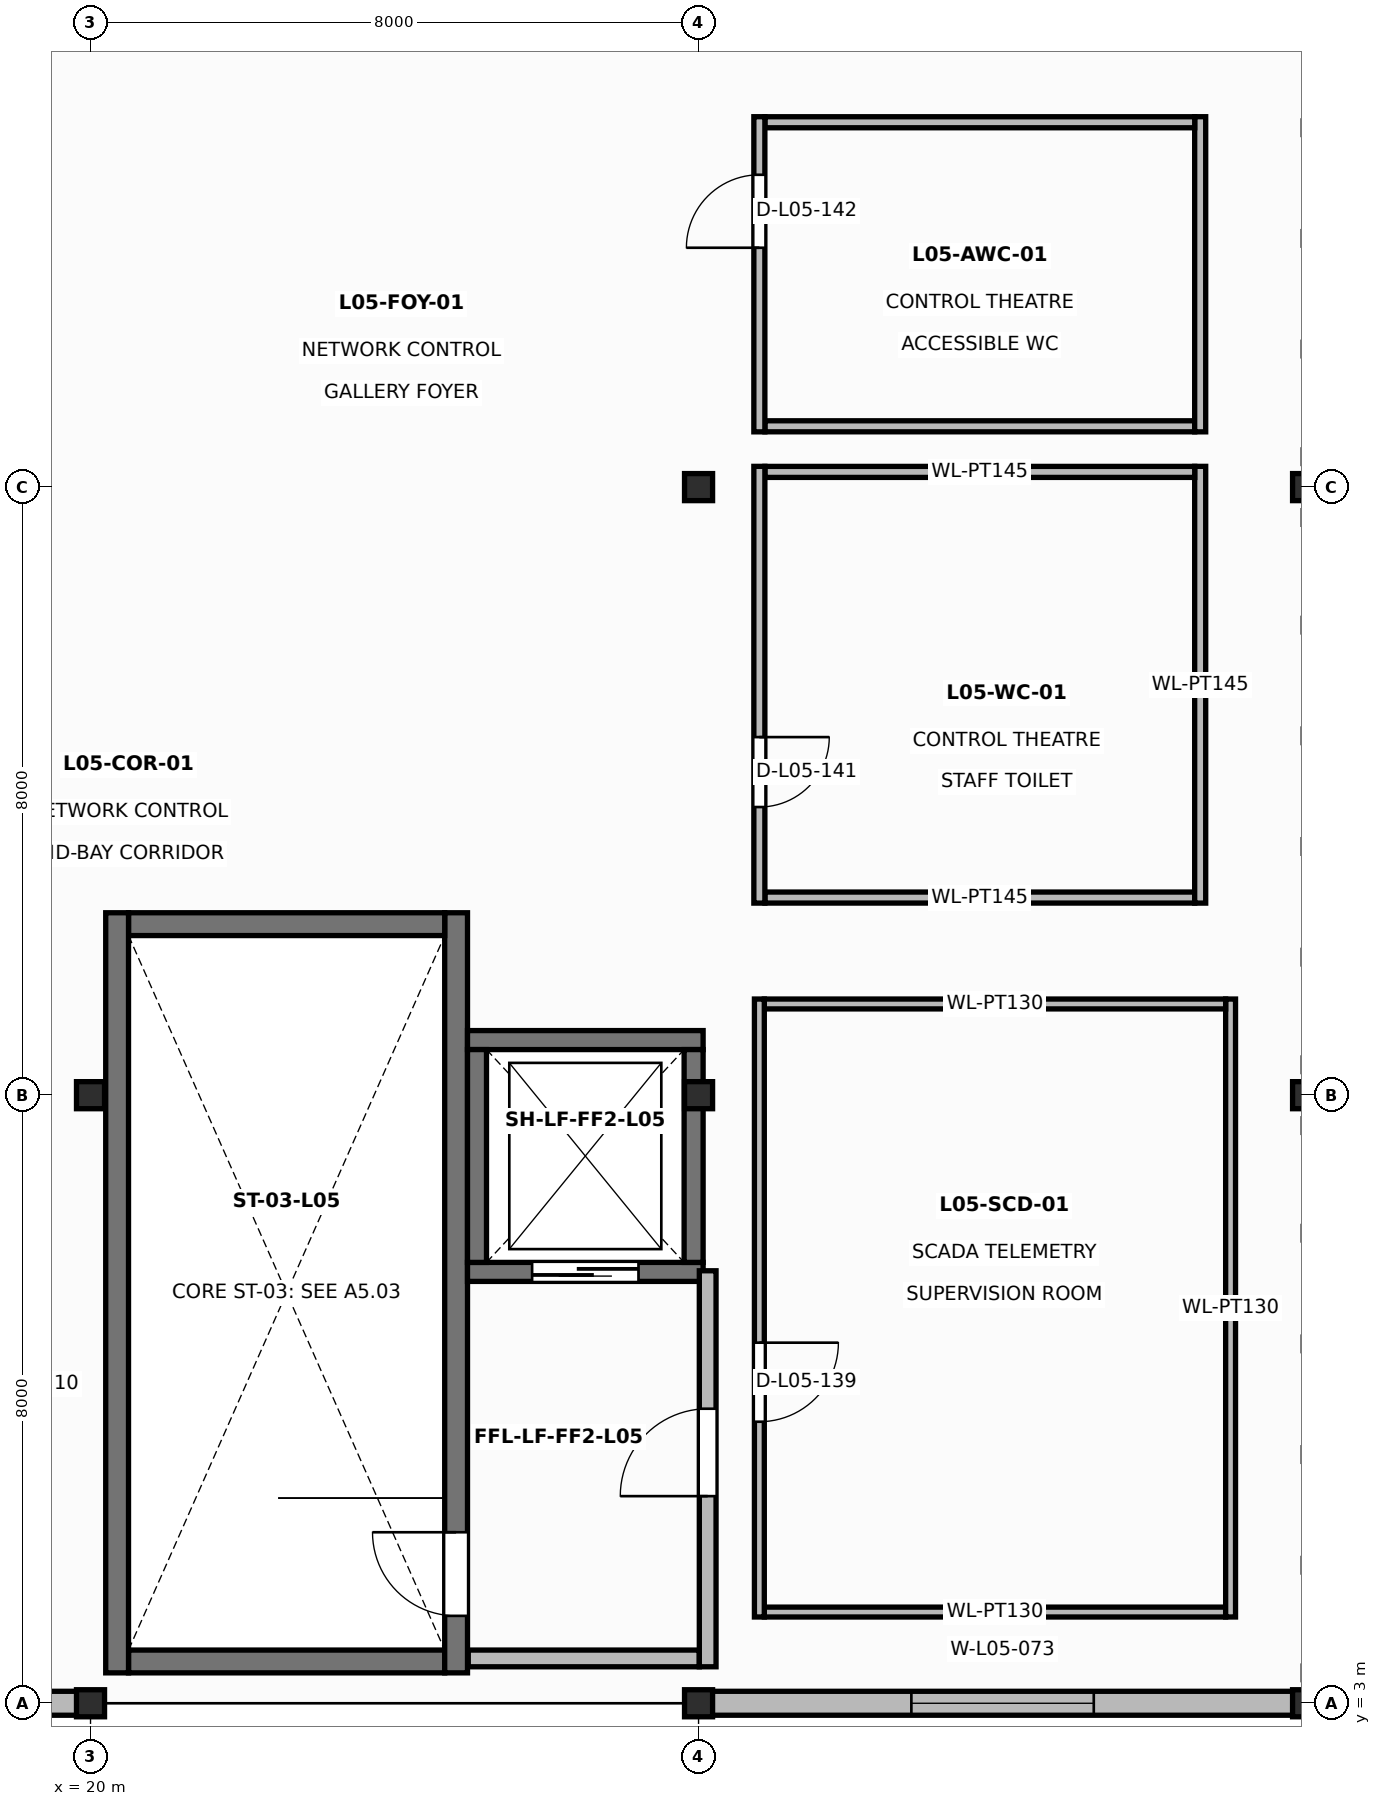
"""IFC4 building model, lengths in metres.
Left out: names, types, materials, properties, quantities, classifications, styles, units other than length and angle.
Written with IfcOpenShell. Run it as: python <this file> out.ifc"""

import sys

from ifc_helpers import new_model, si_unit, direction, frame, frame_2d, origin, origin_2d, place, context, subcontext, project, spatial, rectangle, i_section, extrude, element, fill, save


model = new_model("IFC4")
c1 = context("Model", 3, precision=1e-05, world=origin(), true_north=direction((0.0, 1.0)))
c2 = subcontext(c1, "Body", "Model", "MODEL_VIEW")
j1 = project(units=[si_unit("LENGTHUNIT", "METRE"), si_unit("PLANEANGLEUNIT", "RADIAN")], contexts=[c1])
p1 = place(None, origin())
s1 = spatial("IfcSite", under=j1, at=p1, CompositionType="ELEMENT")
p2 = place(p1, origin())
s2 = spatial("IfcBuilding", under=s1, at=p2, CompositionType="ELEMENT")
p3 = place(p2, frame((0.0, 0.0, 24.0)))
s3 = spatial("IfcBuildingStorey", under=s2, at=p3, CompositionType="ELEMENT", Elevation=24.0)
p4 = place(p3, frame((20.0, 3.0, 0.0), z_axis=(0.0, 0.0, 1.0), x_axis=(1.0, 0.0, 0.0)))
e1 = element("IfcColumn", 1, at=p4, inside=s3, PredefinedType="COLUMN", context=c2, shape_type="SweptSolid", body=[
    extrude(i_section(OverallWidth=0.369, OverallDepth=0.356, WebThickness=0.011, FlangeThickness=0.018, at=origin_2d()), origin(), (0.0, 0.0, 1.0), 3.65),
])
p5 = place(p3, frame((20.0, 11.0, 0.0), z_axis=(0.0, 0.0, 1.0), x_axis=(1.0, 0.0, 0.0)))
e2 = element("IfcColumn", 2, at=p5, inside=s3, PredefinedType="COLUMN", context=c2, shape_type="SweptSolid", body=[
    extrude(i_section(OverallWidth=0.369, OverallDepth=0.356, WebThickness=0.011, FlangeThickness=0.018, at=origin_2d()), origin(), (0.0, 0.0, 1.0), 4.0),
])
p6 = place(p3, frame((28.0, 3.0, 0.0), z_axis=(0.0, 0.0, 1.0), x_axis=(1.0, 0.0, 0.0)))
e3 = element("IfcColumn", 3, at=p6, inside=s3, PredefinedType="COLUMN", context=c2, shape_type="SweptSolid", body=[
    extrude(i_section(OverallWidth=0.369, OverallDepth=0.356, WebThickness=0.011, FlangeThickness=0.018, at=origin_2d()), origin(), (0.0, 0.0, 1.0), 3.65),
])
for number, where, z_axis, x_axis in (
    (4, (28.0, 11.0, 0.0), (0.0, 0.0, 1.0), (1.0, 0.0, 0.0)),
    (5, (28.0, 19.0, 0.0), (0.0, 0.0, 1.0), (1.0, 0.0, 0.0)),
):
    element("IfcColumn", number, at=place(p3, frame(where, z_axis=z_axis, x_axis=x_axis)), inside=s3, PredefinedType="COLUMN", context=c2, shape_type="SweptSolid", body=[
        extrude(i_section(OverallWidth=0.369, OverallDepth=0.356, WebThickness=0.011, FlangeThickness=0.018, at=origin_2d()), origin(), (0.0, 0.0, 1.0), 4.0),
    ])
p7 = place(p3, frame((36.0, 3.0, 0.0), z_axis=(0.0, 0.0, 1.0), x_axis=(1.0, 0.0, 0.0)))
e6 = element("IfcColumn", 6, at=p7, inside=s3, PredefinedType="COLUMN", context=c2, shape_type="SweptSolid", body=[
    extrude(i_section(OverallWidth=0.369, OverallDepth=0.356, WebThickness=0.011, FlangeThickness=0.018, at=origin_2d()), origin(), (0.0, 0.0, 1.0), 3.65),
])
for number, where, z_axis, x_axis in (
    (7, (36.0, 11.0, 0.0), (0.0, 0.0, 1.0), (1.0, 0.0, 0.0)),
    (8, (36.0, 19.0, 0.0), (0.0, 0.0, 1.0), (1.0, 0.0, 0.0)),
):
    element("IfcColumn", number, at=place(p3, frame(where, z_axis=z_axis, x_axis=x_axis)), inside=s3, PredefinedType="COLUMN", context=c2, shape_type="SweptSolid", body=[
        extrude(i_section(OverallWidth=0.369, OverallDepth=0.356, WebThickness=0.011, FlangeThickness=0.018, at=origin_2d()), origin(), (0.0, 0.0, 1.0), 4.0),
    ])
p8 = place(p3, frame((20.5, 3.55, 0.0), z_axis=(0.0, 0.0, 1.0), x_axis=(1.0, 0.0, 0.0)))
e9 = element("IfcWall", 9, at=p8, inside=s3, PredefinedType="SHEAR", context=c2, shape_type="SweptSolid", body=[
    extrude(rectangle(XDim=4.16, YDim=0.3, at=frame_2d((2.08, 0.0))), origin(), (0.0, 0.0, 1.0), 3.6),
])
p9 = place(p3, frame((24.81, 3.4, 0.0), z_axis=(0.0, 0.0, 1.0), x_axis=(0.0, 1.0, 0.0)))
e10 = element("IfcWall", 10, at=p9, inside=s3, PredefinedType="SHEAR", context=c2, shape_type="SweptSolid", body=[
    extrude(rectangle(XDim=10.0, YDim=0.3, at=frame_2d((5.0, 0.0))), origin(), (0.0, 0.0, 1.0), 3.6),
])
p10 = place(p9, frame((0.75, 0.0, 0.0)))
e11 = element("IfcOpeningElement", 11, at=p10, cuts=e10, PredefinedType="OPENING", context=c2, shape_type="SweptSolid", body=[
    extrude(rectangle(XDim=1.1, YDim=2.15, at=frame_2d((0.55, 1.075))), frame((0.0, 0.16, 0.0), z_axis=(0.0, -1.0, 0.0), x_axis=(1.0, 0.0, 0.0)), (0.0, 0.0, 1.0), 0.32),
])
p11 = place(p3, frame((24.66, 13.25, 0.0), z_axis=(0.0, 0.0, 1.0), x_axis=(-1.0, 0.0, 0.0)))
e12 = element("IfcWall", 12, at=p11, inside=s3, PredefinedType="SHEAR", context=c2, shape_type="SweptSolid", body=[
    extrude(rectangle(XDim=4.16, YDim=0.3, at=frame_2d((2.08, 0.0))), origin(), (0.0, 0.0, 1.0), 3.6),
])
p12 = place(p3, frame((20.35, 13.4, 0.0), z_axis=(0.0, 0.0, 1.0), x_axis=(0.0, -1.0, 0.0)))
e13 = element("IfcWall", 13, at=p12, inside=s3, PredefinedType="SHEAR", context=c2, shape_type="SweptSolid", body=[
    extrude(rectangle(XDim=10.0, YDim=0.3, at=frame_2d((5.0, 0.0))), origin(), (0.0, 0.0, 1.0), 3.6),
])
p13 = place(p3, frame((24.96, 8.675, 0.0), z_axis=(0.0, 0.0, 1.0), x_axis=(1.0, 0.0, 0.0)))
e14 = element("IfcWall", 14, at=p13, inside=s3, PredefinedType="SOLIDWALL", context=c2, shape_type="SweptSolid", body=[
    extrude(rectangle(XDim=3.1, YDim=0.25, at=frame_2d((1.55, 0.0))), origin(), (0.0, 0.0, 1.0), 3.35),
])
p14 = place(p13, frame((0.85, 0.0, 0.0)))
e15 = element("IfcOpeningElement", 15, at=p14, cuts=e14, PredefinedType="OPENING", context=c2, shape_type="SweptSolid", body=[
    extrude(rectangle(XDim=1.4, YDim=2.25, at=frame_2d((0.7, 1.125))), frame((0.0, 0.135, 0.0), z_axis=(0.0, -1.0, 0.0), x_axis=(1.0, 0.0, 0.0)), (0.0, 0.0, 1.0), 0.27),
])
p15 = place(p3, frame((28.06, 11.725, 0.0), z_axis=(0.0, 0.0, 1.0), x_axis=(-1.0, 0.0, 0.0)))
e16 = element("IfcWall", 16, at=p15, inside=s3, PredefinedType="SOLIDWALL", context=c2, shape_type="SweptSolid", body=[
    extrude(rectangle(XDim=3.1, YDim=0.25, at=frame_2d((1.55, 0.0))), origin(), (0.0, 0.0, 1.0), 3.35),
])
for number, where, z_axis, x_axis in (
    (17, (27.935, 8.8, 0.0), (0.0, 0.0, 1.0), (0.0, 1.0, 0.0)),
    (18, (25.085, 11.6, 0.0), (0.0, 0.0, 1.0), (0.0, -1.0, 0.0)),
):
    element("IfcWall", number, at=place(p3, frame(where, z_axis=z_axis, x_axis=x_axis)), inside=s3, PredefinedType="SOLIDWALL", context=c2, shape_type="SweptSolid", body=[
        extrude(rectangle(XDim=2.8, YDim=0.25, at=frame_2d((1.4, 0.0))), origin(), (0.0, 0.0, 1.0), 3.35),
    ])
p16 = place(p3, frame((24.97, 3.59, 0.0), z_axis=(0.0, 0.0, 1.0), x_axis=(1.0, 0.0, 0.0)))
e19 = element("IfcWall", 19, at=p16, inside=s3, PredefinedType="SOLIDWALL", context=c2, shape_type="SweptSolid", body=[
    extrude(rectangle(XDim=3.04, YDim=0.22, at=frame_2d((1.52, 0.0))), origin(), (0.0, 0.0, 1.0), 3.35),
])
p17 = place(p3, frame((28.12, 3.48, 0.0), z_axis=(0.0, 0.0, 1.0), x_axis=(0.0, 1.0, 0.0)))
e20 = element("IfcWall", 20, at=p17, inside=s3, PredefinedType="SOLIDWALL", context=c2, shape_type="SweptSolid", body=[
    extrude(rectangle(XDim=5.21, YDim=0.22, at=frame_2d((2.605, 0.0))), origin(), (0.0, 0.0, 1.0), 3.35),
])
p18 = place(p17, frame((2.245, 0.0, 0.0)))
e21 = element("IfcOpeningElement", 21, at=p18, cuts=e20, PredefinedType="OPENING", context=c2, shape_type="SweptSolid", body=[
    extrude(rectangle(XDim=1.15, YDim=2.15, at=frame_2d((0.575, 1.075))), frame((0.0, 0.12, 0.0), z_axis=(0.0, -1.0, 0.0), x_axis=(1.0, 0.0, 0.0)), (0.0, 0.0, 1.0), 0.24),
])
p19 = place(p3, frame((12.008, 3.0, 0.0), z_axis=(0.0, 0.0, 1.0), x_axis=(1.0, 0.0, 0.0)))
e22 = element("IfcWall", 22, at=p19, inside=s3, PredefinedType="SOLIDWALL", context=c2, shape_type="SweptSolid", body=[
    extrude(rectangle(XDim=7.984, YDim=0.315, at=frame_2d((3.992, 0.0))), origin(), (0.0, 0.0, 1.0), 3.2),
])
p20 = place(p19, frame((3.367, 0.0, 0.85)))
e23 = element("IfcOpeningElement", 23, at=p20, cuts=e22, PredefinedType="OPENING", context=c2, shape_type="SweptSolid", body=[
    extrude(rectangle(XDim=1.25, YDim=1.75, at=frame_2d((0.625, 0.875))), frame((0.0, 0.167, 0.0), z_axis=(0.0, -1.0, 0.0), x_axis=(1.0, 0.0, 0.0)), (0.0, 0.0, 1.0), 0.335),
])
p21 = place(p3, frame((28.008, 3.0, 0.0), z_axis=(0.0, 0.0, 1.0), x_axis=(1.0, 0.0, 0.0)))
e24 = element("IfcWall", 24, at=p21, inside=s3, PredefinedType="SOLIDWALL", context=c2, shape_type="SweptSolid", body=[
    extrude(rectangle(XDim=7.984, YDim=0.315, at=frame_2d((3.992, 0.0))), origin(), (0.0, 0.0, 1.0), 3.2),
])
p22 = place(p21, frame((2.792, 0.0, 0.65)))
e25 = element("IfcOpeningElement", 25, at=p22, cuts=e24, PredefinedType="OPENING", context=c2, shape_type="SweptSolid", body=[
    extrude(rectangle(XDim=2.4, YDim=2.1, at=frame_2d((1.2, 1.05))), frame((0.0, 0.167, 0.0), z_axis=(0.0, -1.0, 0.0), x_axis=(1.0, 0.0, 0.0)), (0.0, 0.0, 1.0), 0.335),
])
p23 = place(p3, frame((28.865, 4.2, 0.0), z_axis=(0.0, 0.0, 1.0), x_axis=(1.0, 0.0, 0.0)))
e26 = element("IfcWall", 26, at=p23, inside=s3, PredefinedType="PARTITIONING", context=c2, shape_type="SweptSolid", body=[
    extrude(rectangle(XDim=6.07, YDim=0.13, at=frame_2d((3.035, 0.0))), origin(), (0.0, 0.0, 1.0), 3.6),
])
p24 = place(p3, frame((35.0, 4.135, 0.0), z_axis=(0.0, 0.0, 1.0), x_axis=(0.0, 1.0, 0.0)))
e27 = element("IfcWall", 27, at=p24, inside=s3, PredefinedType="PARTITIONING", context=c2, shape_type="SweptSolid", body=[
    extrude(rectangle(XDim=8.13, YDim=0.13, at=frame_2d((4.065, 0.0))), origin(), (0.0, 0.0, 1.0), 3.6),
])
p25 = place(p3, frame((34.935, 12.2, 0.0), z_axis=(0.0, 0.0, 1.0), x_axis=(-1.0, 0.0, 0.0)))
e28 = element("IfcWall", 28, at=p25, inside=s3, PredefinedType="PARTITIONING", context=c2, shape_type="SweptSolid", body=[
    extrude(rectangle(XDim=6.07, YDim=0.13, at=frame_2d((3.035, 0.0))), origin(), (0.0, 0.0, 1.0), 3.6),
])
p26 = place(p3, frame((28.8, 12.265, 0.0), z_axis=(0.0, 0.0, 1.0), x_axis=(0.0, -1.0, 0.0)))
e29 = element("IfcWall", 29, at=p26, inside=s3, PredefinedType="PARTITIONING", context=c2, shape_type="SweptSolid", body=[
    extrude(rectangle(XDim=8.13, YDim=0.13, at=frame_2d((4.065, 0.0))), origin(), (0.0, 0.0, 1.0), 3.6),
])
p27 = place(p26, frame((4.521, 0.0, 0.0)))
e30 = element("IfcOpeningElement", 30, at=p27, cuts=e29, PredefinedType="OPENING", context=c2, shape_type="SweptSolid", body=[
    extrude(rectangle(XDim=1.04, YDim=2.16, at=frame_2d((0.52, 1.08))), frame((0.0, 0.075, 0.0), z_axis=(0.0, -1.0, 0.0), x_axis=(1.0, 0.0, 0.0)), (0.0, 0.0, 1.0), 0.15),
])
p28 = place(p3, frame((28.873, 13.6, 0.0), z_axis=(0.0, 0.0, 1.0), x_axis=(1.0, 0.0, 0.0)))
e31 = element("IfcWall", 31, at=p28, inside=s3, PredefinedType="PARTITIONING", context=c2, shape_type="SweptSolid", body=[
    extrude(rectangle(XDim=5.655, YDim=0.145, at=frame_2d((2.828, 0.0))), origin(), (0.0, 0.0, 1.0), 3.6),
])
p29 = place(p3, frame((34.6, 13.527, 0.0), z_axis=(0.0, 0.0, 1.0), x_axis=(0.0, 1.0, 0.0)))
e32 = element("IfcWall", 32, at=p29, inside=s3, PredefinedType="PARTITIONING", context=c2, shape_type="SweptSolid", body=[
    extrude(rectangle(XDim=5.746, YDim=0.145, at=frame_2d((2.873, 0.0))), origin(), (0.0, 0.0, 1.0), 3.6),
])
p30 = place(p3, frame((34.528, 19.2, 0.0), z_axis=(0.0, 0.0, 1.0), x_axis=(-1.0, 0.0, 0.0)))
e33 = element("IfcWall", 33, at=p30, inside=s3, PredefinedType="PARTITIONING", context=c2, shape_type="SweptSolid", body=[
    extrude(rectangle(XDim=5.655, YDim=0.145, at=frame_2d((2.828, 0.0))), origin(), (0.0, 0.0, 1.0), 3.6),
])
p31 = place(p3, frame((28.8, 19.273, 0.0), z_axis=(0.0, 0.0, 1.0), x_axis=(0.0, -1.0, 0.0)))
e34 = element("IfcWall", 34, at=p31, inside=s3, PredefinedType="PARTITIONING", context=c2, shape_type="SweptSolid", body=[
    extrude(rectangle(XDim=5.746, YDim=0.145, at=frame_2d((2.873, 0.0))), origin(), (0.0, 0.0, 1.0), 3.6),
])
p32 = place(p31, frame((3.562, 0.0, 0.0)))
e35 = element("IfcOpeningElement", 35, at=p32, cuts=e34, PredefinedType="OPENING", context=c2, shape_type="SweptSolid", body=[
    extrude(rectangle(XDim=0.92, YDim=2.1, at=frame_2d((0.46, 1.05))), frame((0.0, 0.083, 0.0), z_axis=(0.0, -1.0, 0.0), x_axis=(1.0, 0.0, 0.0)), (0.0, 0.0, 1.0), 0.165),
])
p33 = place(p3, frame((28.873, 19.8, 0.0), z_axis=(0.0, 0.0, 1.0), x_axis=(1.0, 0.0, 0.0)))
e36 = element("IfcWall", 36, at=p33, inside=s3, PredefinedType="PARTITIONING", context=c2, shape_type="SweptSolid", body=[
    extrude(rectangle(XDim=5.655, YDim=0.145, at=frame_2d((2.828, 0.0))), origin(), (0.0, 0.0, 1.0), 3.6),
])
p34 = place(p3, frame((34.6, 19.727, 0.0), z_axis=(0.0, 0.0, 1.0), x_axis=(0.0, 1.0, 0.0)))
e37 = element("IfcWall", 37, at=p34, inside=s3, PredefinedType="PARTITIONING", context=c2, shape_type="SweptSolid", body=[
    extrude(rectangle(XDim=4.146, YDim=0.145, at=frame_2d((2.073, 0.0))), origin(), (0.0, 0.0, 1.0), 3.6),
])
p35 = place(p3, frame((34.528, 23.8, 0.0), z_axis=(0.0, 0.0, 1.0), x_axis=(-1.0, 0.0, 0.0)))
e38 = element("IfcWall", 38, at=p35, inside=s3, PredefinedType="PARTITIONING", context=c2, shape_type="SweptSolid", body=[
    extrude(rectangle(XDim=5.655, YDim=0.145, at=frame_2d((2.828, 0.0))), origin(), (0.0, 0.0, 1.0), 3.6),
])
p36 = place(p3, frame((28.8, 23.873, 0.0), z_axis=(0.0, 0.0, 1.0), x_axis=(0.0, -1.0, 0.0)))
e39 = element("IfcWall", 39, at=p36, inside=s3, PredefinedType="PARTITIONING", context=c2, shape_type="SweptSolid", body=[
    extrude(rectangle(XDim=4.146, YDim=0.145, at=frame_2d((2.073, 0.0))), origin(), (0.0, 0.0, 1.0), 3.6),
])
p37 = place(p36, frame((0.764, 0.0, 0.0)))
e40 = element("IfcOpeningElement", 40, at=p37, cuts=e39, PredefinedType="OPENING", context=c2, shape_type="SweptSolid", body=[
    extrude(rectangle(XDim=0.96, YDim=2.12, at=frame_2d((0.48, 1.06))), frame((0.0, 0.083, 0.0), z_axis=(0.0, -1.0, 0.0), x_axis=(1.0, 0.0, 0.0)), (0.0, 0.0, 1.0), 0.165),
])
p38 = place(p10, origin())
e41 = element("IfcDoor", 41, at=p38, inside=s3, OperationType="SINGLE_SWING_RIGHT", PredefinedType="DOOR", context=c2, shape_type="SweptSolid", body=[
    extrude(rectangle(XDim=1.1, YDim=2.15, at=frame_2d((0.55, 1.075))), frame((0.0, 0.025, 0.0), z_axis=(0.0, -1.0, 0.0), x_axis=(1.0, 0.0, 0.0)), (0.0, 0.0, 1.0), 0.05),
])
fill(e11, e41)
p39 = place(p14, frame((1.4, 0.0, 0.0), z_axis=(0.0, 0.0, 1.0), x_axis=(-1.0, 0.0, 0.0)))
e42 = element("IfcDoor", 42, at=p39, inside=s3, OperationType="DOUBLE_DOOR_SLIDING", PredefinedType="DOOR", context=c2, shape_type="SweptSolid", body=[
    extrude(rectangle(XDim=1.4, YDim=2.25, at=frame_2d((0.7, 1.125))), frame((0.0, 0.025, 0.0), z_axis=(0.0, -1.0, 0.0), x_axis=(1.0, 0.0, 0.0)), (0.0, 0.0, 1.0), 0.05),
])
fill(e15, e42)
p40 = place(p18, origin())
e43 = element("IfcDoor", 43, at=p40, inside=s3, OperationType="SINGLE_SWING_LEFT", PredefinedType="DOOR", context=c2, shape_type="SweptSolid", body=[
    extrude(rectangle(XDim=1.15, YDim=2.15, at=frame_2d((0.575, 1.075))), frame((0.0, 0.025, 0.0), z_axis=(0.0, -1.0, 0.0), x_axis=(1.0, 0.0, 0.0)), (0.0, 0.0, 1.0), 0.05),
])
fill(e21, e43)
p41 = place(p22, origin())
e44 = element("IfcWindow", 44, at=p41, inside=s3, PartitioningType="SINGLE_PANEL", PredefinedType="WINDOW", context=c2, shape_type="SweptSolid", body=[
    extrude(rectangle(XDim=2.4, YDim=2.1, at=frame_2d((1.2, 1.05))), frame((0.0, 0.03, 0.0), z_axis=(0.0, -1.0, 0.0), x_axis=(1.0, 0.0, 0.0)), (0.0, 0.0, 1.0), 0.06),
])
fill(e25, e44)
p42 = place(p27, origin())
e45 = element("IfcDoor", 45, at=p42, inside=s3, OperationType="SINGLE_SWING_LEFT", PredefinedType="DOOR", context=c2, shape_type="SweptSolid", body=[
    extrude(rectangle(XDim=1.04, YDim=2.16, at=frame_2d((0.52, 1.08))), frame((0.0, 0.025, 0.0), z_axis=(0.0, -1.0, 0.0), x_axis=(1.0, 0.0, 0.0)), (0.0, 0.0, 1.0), 0.05),
])
fill(e30, e45)
p43 = place(p32, origin())
e46 = element("IfcDoor", 46, at=p43, inside=s3, OperationType="SINGLE_SWING_LEFT", PredefinedType="DOOR", context=c2, shape_type="SweptSolid", body=[
    extrude(rectangle(XDim=0.92, YDim=2.1, at=frame_2d((0.46, 1.05))), frame((0.0, 0.025, 0.0), z_axis=(0.0, -1.0, 0.0), x_axis=(1.0, 0.0, 0.0)), (0.0, 0.0, 1.0), 0.05),
])
fill(e35, e46)
p44 = place(p37, frame((0.96, 0.0, 0.0), z_axis=(0.0, 0.0, 1.0), x_axis=(-1.0, 0.0, 0.0)))
e47 = element("IfcDoor", 47, at=p44, inside=s3, OperationType="SINGLE_SWING_RIGHT", PredefinedType="DOOR", context=c2, shape_type="SweptSolid", body=[
    extrude(rectangle(XDim=0.96, YDim=2.12, at=frame_2d((0.48, 1.06))), frame((0.0, 0.025, 0.0), z_axis=(0.0, -1.0, 0.0), x_axis=(1.0, 0.0, 0.0)), (0.0, 0.0, 1.0), 0.05),
])
fill(e40, e47)
save(model, sys.argv[1])
